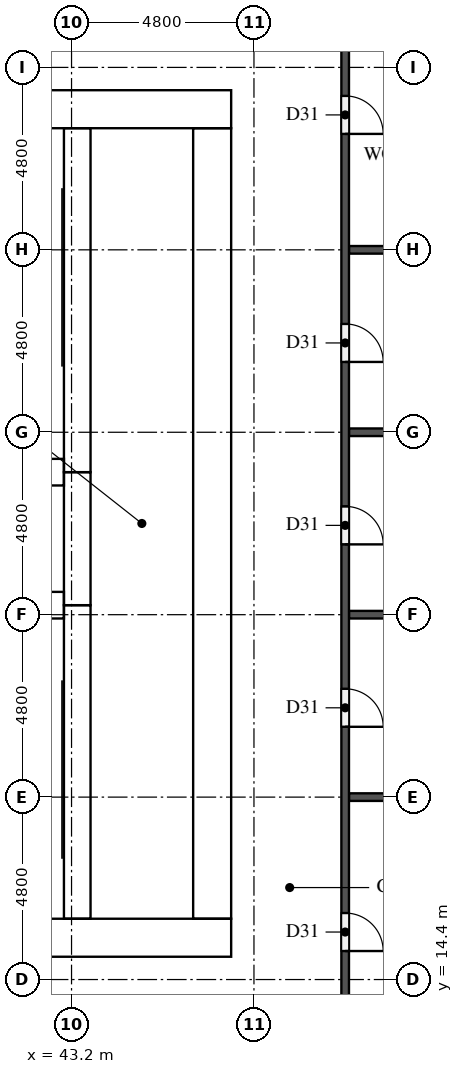
"""IFC4 building model, lengths in metres.
Left out: names, types, materials, properties, quantities, classifications, styles, units other than length and angle.
Written with IfcOpenShell. Run it as: python <this file> out.ifc"""

import sys

from ifc_helpers import new_model, si_unit, direction, frame, frame_2d, origin, place, context, subcontext, project, spatial, rectangle, extrude, element, fill, save


model = new_model("IFC4")
c1 = context("Model", 3, precision=1e-05, world=origin(), true_north=direction((0.0, 1.0)))
c2 = subcontext(c1, "Body", "Model", "MODEL_VIEW")
j1 = project(units=[si_unit("LENGTHUNIT", "METRE"), si_unit("PLANEANGLEUNIT", "RADIAN")], contexts=[c1])
p1 = place(None, origin())
s1 = spatial("IfcSite", under=j1, at=p1, CompositionType="ELEMENT")
p2 = place(p1, origin())
s2 = spatial("IfcBuilding", under=s1, at=p2, CompositionType="ELEMENT")
p3 = place(p2, frame((0.0, 0.0, 24.0)))
s3 = spatial("IfcBuildingStorey", under=s2, at=p3, CompositionType="ELEMENT", Elevation=24.0)
p4 = place(p3, frame((15.0, 15.5, 0.0), z_axis=(0.0, 0.0, 1.0), x_axis=(1.0, 0.0, 0.0)))
e1 = element("IfcWall", 1, at=p4, inside=s3, PredefinedType="SHEAR", context=c2, shape_type="SweptSolid", body=[
    extrude(rectangle(XDim=32.4, YDim=1.0, at=frame_2d((16.2, 0.0))), origin(), (0.0, 0.0, 1.0), 5.1),
])
p5 = place(p4, frame((15.3, 0.0, 0.0)))
e2 = element("IfcOpeningElement", 2, at=p5, cuts=e1, PredefinedType="OPENING", context=c2, shape_type="SweptSolid", body=[
    extrude(rectangle(XDim=1.8, YDim=2.1, at=frame_2d((0.9, 1.05))), frame((0.0, 0.51, 0.0), z_axis=(0.0, -1.0, 0.0), x_axis=(1.0, 0.0, 0.0)), (0.0, 0.0, 1.0), 1.02),
])
p6 = place(p3, frame((15.0, 37.3, 0.0), z_axis=(0.0, 0.0, 1.0), x_axis=(1.0, 0.0, 0.0)))
e3 = element("IfcWall", 3, at=p6, inside=s3, PredefinedType="SHEAR", context=c2, shape_type="SweptSolid", body=[
    extrude(rectangle(XDim=32.4, YDim=1.0, at=frame_2d((16.2, 0.0))), origin(), (0.0, 0.0, 1.0), 5.1),
])
p7 = place(p6, frame((15.3, 0.0, 0.0)))
e4 = element("IfcOpeningElement", 4, at=p7, cuts=e3, PredefinedType="OPENING", context=c2, shape_type="SweptSolid", body=[
    extrude(rectangle(XDim=1.8, YDim=2.1, at=frame_2d((0.9, 1.05))), frame((0.0, 0.51, 0.0), z_axis=(0.0, -1.0, 0.0), x_axis=(1.0, 0.0, 0.0)), (0.0, 0.0, 1.0), 1.02),
])
p8 = place(p6, frame((1.766, 0.0, 0.0)))
e5 = element("IfcOpeningElement", 5, at=p8, cuts=e3, PredefinedType="OPENING", context=c2, shape_type="SweptSolid", body=[
    extrude(rectangle(XDim=1.0, YDim=2.1, at=frame_2d((0.5, 1.05))), frame((0.0, 0.51, 0.0), z_axis=(0.0, -1.0, 0.0), x_axis=(1.0, 0.0, 0.0)), (0.0, 0.0, 1.0), 1.02),
])
p9 = place(p6, frame((5.241, 0.0, 0.0)))
e6 = element("IfcOpeningElement", 6, at=p9, cuts=e3, PredefinedType="OPENING", context=c2, shape_type="SweptSolid", body=[
    extrude(rectangle(XDim=1.0, YDim=2.1, at=frame_2d((0.5, 1.05))), frame((0.0, 0.51, 0.0), z_axis=(0.0, -1.0, 0.0), x_axis=(1.0, 0.0, 0.0)), (0.0, 0.0, 1.0), 1.02),
])
p10 = place(p3, frame((46.9, 16.0, 0.0), z_axis=(0.0, 0.0, 1.0), x_axis=(0.0, 1.0, 0.0)))
e7 = element("IfcWall", 7, at=p10, inside=s3, PredefinedType="SHEAR", context=c2, shape_type="SweptSolid", body=[
    extrude(rectangle(XDim=20.8, YDim=1.0, at=frame_2d((10.4, 0.0))), origin(), (0.0, 0.0, 1.0), 5.1),
])
p11 = place(p10, frame((10.1, 0.0, 0.0)))
e8 = element("IfcOpeningElement", 8, at=p11, cuts=e7, PredefinedType="OPENING", context=c2, shape_type="SweptSolid", body=[
    extrude(rectangle(XDim=1.2, YDim=2.1, at=frame_2d((0.6, 1.05))), frame((0.0, 0.51, 0.0), z_axis=(0.0, -1.0, 0.0), x_axis=(1.0, 0.0, 0.0)), (0.0, 0.0, 1.0), 1.02),
])
p12 = place(p3, frame((43.35, 16.0, 0.0), z_axis=(0.0, 0.0, 1.0), x_axis=(0.0, 1.0, 0.0)))
e9 = element("IfcWall", 9, at=p12, inside=s3, PredefinedType="SHEAR", context=c2, shape_type="SweptSolid", body=[
    extrude(rectangle(XDim=8.25, YDim=0.7, at=frame_2d((4.125, 0.0))), origin(), (0.0, 0.0, 1.0), 5.1),
])
p13 = place(p12, frame((0.2, 0.0, 0.0)))
e10 = element("IfcOpeningElement", 10, at=p13, cuts=e9, PredefinedType="OPENING", context=c2, shape_type="SweptSolid", body=[
    extrude(rectangle(XDim=1.2, YDim=2.1, at=frame_2d((0.6, 1.05))), frame((0.0, 0.36, 0.0), z_axis=(0.0, -1.0, 0.0), x_axis=(1.0, 0.0, 0.0)), (0.0, 0.0, 1.0), 0.72),
])
p14 = place(p3, frame((43.35, 24.25, 0.0), z_axis=(0.0, 0.0, 1.0), x_axis=(0.0, 1.0, 0.0)))
e11 = element("IfcWall", 11, at=p14, inside=s3, PredefinedType="SHEAR", context=c2, shape_type="SweptSolid", body=[
    extrude(rectangle(XDim=3.5, YDim=0.7, at=frame_2d((1.75, 0.0))), origin(), (0.0, 0.0, 1.0), 5.1),
])
p15 = place(p14, frame((1.2, 0.0, 0.0)))
e12 = element("IfcOpeningElement", 12, at=p15, cuts=e11, PredefinedType="OPENING", context=c2, shape_type="SweptSolid", body=[
    extrude(rectangle(XDim=1.1, YDim=2.1, at=frame_2d((0.55, 1.05))), frame((0.0, 0.36, 0.0), z_axis=(0.0, -1.0, 0.0), x_axis=(1.0, 0.0, 0.0)), (0.0, 0.0, 1.0), 0.72),
])
p16 = place(p3, frame((43.35, 27.75, 0.0), z_axis=(0.0, 0.0, 1.0), x_axis=(0.0, 1.0, 0.0)))
e13 = element("IfcWall", 13, at=p16, inside=s3, PredefinedType="SHEAR", context=c2, shape_type="SweptSolid", body=[
    extrude(rectangle(XDim=9.05, YDim=0.7, at=frame_2d((4.525, 0.0))), origin(), (0.0, 0.0, 1.0), 5.1),
])
p17 = place(p16, frame((7.65, 0.0, 0.0)))
e14 = element("IfcOpeningElement", 14, at=p17, cuts=e13, PredefinedType="OPENING", context=c2, shape_type="SweptSolid", body=[
    extrude(rectangle(XDim=1.2, YDim=2.1, at=frame_2d((0.6, 1.05))), frame((0.0, 0.36, 0.0), z_axis=(0.0, -1.0, 0.0), x_axis=(1.0, 0.0, 0.0)), (0.0, 0.0, 1.0), 0.72),
])
for number, where, z_axis, x_axis in (
    (15, (39.65, 24.25, 0.0), (0.0, 0.0, 1.0), (1.0, 0.0, 0.0)),
    (16, (39.65, 27.75, 0.0), (0.0, 0.0, 1.0), (1.0, 0.0, 0.0)),
):
    element("IfcWall", number, at=place(p3, frame(where, z_axis=z_axis, x_axis=x_axis)), inside=s3, PredefinedType="SHEAR", context=c2, shape_type="SweptSolid", body=[
        extrude(rectangle(XDim=3.35, YDim=0.7, at=frame_2d((1.675, 0.0))), origin(), (0.0, 0.0, 1.0), 5.1),
    ])
for number, where, z_axis, x_axis in (
    (17, (50.5, 19.2, 0.0), (0.0, 0.0, 1.0), (1.0, 0.0, 0.0)),
    (18, (50.5, 24.0, 0.0), (0.0, 0.0, 1.0), (1.0, 0.0, 0.0)),
    (19, (50.5, 28.8, 0.0), (0.0, 0.0, 1.0), (1.0, 0.0, 0.0)),
    (20, (50.5, 33.6, 0.0), (0.0, 0.0, 1.0), (1.0, 0.0, 0.0)),
):
    element("IfcWall", number, at=place(p3, frame(where, z_axis=z_axis, x_axis=x_axis)), inside=s3, PredefinedType="PARTITIONING", context=c2, shape_type="SweptSolid", body=[
        extrude(rectangle(XDim=4.8, YDim=0.2, at=frame_2d((2.4, 0.0))), origin(), (0.0, 0.0, 1.0), 5.1),
    ])
p18 = place(p3, frame((50.4, 40.7, 0.0), z_axis=(0.0, 0.0, 1.0), x_axis=(0.0, -1.0, 0.0)))
e21 = element("IfcWall", 21, at=p18, inside=s3, PredefinedType="PARTITIONING", context=c2, shape_type="SweptSolid", body=[
    extrude(rectangle(XDim=28.6, YDim=0.2, at=frame_2d((14.3, 0.0))), origin(), (0.0, 0.0, 1.0), 5.1),
])
p19 = place(p18, frame((24.55, 0.0, 0.0)))
e22 = element("IfcOpeningElement", 22, at=p19, cuts=e21, PredefinedType="OPENING", context=c2, shape_type="SweptSolid", body=[
    extrude(rectangle(XDim=1.0, YDim=2.1, at=frame_2d((0.5, 1.05))), frame((0.0, 0.11, 0.0), z_axis=(0.0, -1.0, 0.0), x_axis=(1.0, 0.0, 0.0)), (0.0, 0.0, 1.0), 0.22),
])
p20 = place(p18, frame((18.65, 0.0, 0.0)))
e23 = element("IfcOpeningElement", 23, at=p20, cuts=e21, PredefinedType="OPENING", context=c2, shape_type="SweptSolid", body=[
    extrude(rectangle(XDim=1.0, YDim=2.1, at=frame_2d((0.5, 1.05))), frame((0.0, 0.11, 0.0), z_axis=(0.0, -1.0, 0.0), x_axis=(1.0, 0.0, 0.0)), (0.0, 0.0, 1.0), 0.22),
])
p21 = place(p18, frame((13.85, 0.0, 0.0)))
e24 = element("IfcOpeningElement", 24, at=p21, cuts=e21, PredefinedType="OPENING", context=c2, shape_type="SweptSolid", body=[
    extrude(rectangle(XDim=1.0, YDim=2.1, at=frame_2d((0.5, 1.05))), frame((0.0, 0.11, 0.0), z_axis=(0.0, -1.0, 0.0), x_axis=(1.0, 0.0, 0.0)), (0.0, 0.0, 1.0), 0.22),
])
p22 = place(p18, frame((9.05, 0.0, 0.0)))
e25 = element("IfcOpeningElement", 25, at=p22, cuts=e21, PredefinedType="OPENING", context=c2, shape_type="SweptSolid", body=[
    extrude(rectangle(XDim=1.0, YDim=2.1, at=frame_2d((0.5, 1.05))), frame((0.0, 0.11, 0.0), z_axis=(0.0, -1.0, 0.0), x_axis=(1.0, 0.0, 0.0)), (0.0, 0.0, 1.0), 0.22),
])
p23 = place(p18, frame((3.05, 0.0, 0.0)))
e26 = element("IfcOpeningElement", 26, at=p23, cuts=e21, PredefinedType="OPENING", context=c2, shape_type="SweptSolid", body=[
    extrude(rectangle(XDim=1.0, YDim=2.1, at=frame_2d((0.5, 1.05))), frame((0.0, 0.11, 0.0), z_axis=(0.0, -1.0, 0.0), x_axis=(1.0, 0.0, 0.0)), (0.0, 0.0, 1.0), 0.22),
])
p24 = place(p15, origin())
e27 = element("IfcDoor", 27, at=p24, inside=s3, OperationType="DOUBLE_DOOR_SLIDING", PredefinedType="DOOR", context=c2, shape_type="SweptSolid", body=[
    extrude(rectangle(XDim=1.1, YDim=2.1, at=frame_2d((0.55, 1.05))), frame((0.0, 0.025, 0.0), z_axis=(0.0, -1.0, 0.0), x_axis=(1.0, 0.0, 0.0)), (0.0, 0.0, 1.0), 0.05),
])
fill(e12, e27)
p25 = place(p13, origin())
e28 = element("IfcDoor", 28, at=p25, inside=s3, OperationType="SINGLE_SWING_RIGHT", PredefinedType="DOOR", context=c2, shape_type="SweptSolid", body=[
    extrude(rectangle(XDim=1.2, YDim=2.1, at=frame_2d((0.6, 1.05))), frame((0.0, 0.025, 0.0), z_axis=(0.0, -1.0, 0.0), x_axis=(1.0, 0.0, 0.0)), (0.0, 0.0, 1.0), 0.05),
])
fill(e10, e28)
p26 = place(p17, origin())
e29 = element("IfcDoor", 29, at=p26, inside=s3, OperationType="SINGLE_SWING_LEFT", PredefinedType="DOOR", context=c2, shape_type="SweptSolid", body=[
    extrude(rectangle(XDim=1.2, YDim=2.1, at=frame_2d((0.6, 1.05))), frame((0.0, 0.025, 0.0), z_axis=(0.0, -1.0, 0.0), x_axis=(1.0, 0.0, 0.0)), (0.0, 0.0, 1.0), 0.05),
])
fill(e14, e29)
p27 = place(p11, origin())
e30 = element("IfcDoor", 30, at=p27, inside=s3, OperationType="SINGLE_SWING_LEFT", PredefinedType="DOOR", context=c2, shape_type="SweptSolid", body=[
    extrude(rectangle(XDim=1.2, YDim=2.1, at=frame_2d((0.6, 1.05))), frame((0.0, 0.025, 0.0), z_axis=(0.0, -1.0, 0.0), x_axis=(1.0, 0.0, 0.0)), (0.0, 0.0, 1.0), 0.05),
])
fill(e8, e30)
p28 = place(p19, origin())
e31 = element("IfcDoor", 31, at=p28, inside=s3, OperationType="SINGLE_SWING_RIGHT", PredefinedType="DOOR", context=c2, shape_type="SweptSolid", body=[
    extrude(rectangle(XDim=1.0, YDim=2.1, at=frame_2d((0.5, 1.05))), frame((0.0, 0.025, 0.0), z_axis=(0.0, -1.0, 0.0), x_axis=(1.0, 0.0, 0.0)), (0.0, 0.0, 1.0), 0.05),
])
fill(e22, e31)
p29 = place(p20, origin())
e32 = element("IfcDoor", 32, at=p29, inside=s3, OperationType="SINGLE_SWING_RIGHT", PredefinedType="DOOR", context=c2, shape_type="SweptSolid", body=[
    extrude(rectangle(XDim=1.0, YDim=2.1, at=frame_2d((0.5, 1.05))), frame((0.0, 0.025, 0.0), z_axis=(0.0, -1.0, 0.0), x_axis=(1.0, 0.0, 0.0)), (0.0, 0.0, 1.0), 0.05),
])
fill(e23, e32)
p30 = place(p21, origin())
e33 = element("IfcDoor", 33, at=p30, inside=s3, OperationType="SINGLE_SWING_RIGHT", PredefinedType="DOOR", context=c2, shape_type="SweptSolid", body=[
    extrude(rectangle(XDim=1.0, YDim=2.1, at=frame_2d((0.5, 1.05))), frame((0.0, 0.025, 0.0), z_axis=(0.0, -1.0, 0.0), x_axis=(1.0, 0.0, 0.0)), (0.0, 0.0, 1.0), 0.05),
])
fill(e24, e33)
p31 = place(p22, origin())
e34 = element("IfcDoor", 34, at=p31, inside=s3, OperationType="SINGLE_SWING_RIGHT", PredefinedType="DOOR", context=c2, shape_type="SweptSolid", body=[
    extrude(rectangle(XDim=1.0, YDim=2.1, at=frame_2d((0.5, 1.05))), frame((0.0, 0.025, 0.0), z_axis=(0.0, -1.0, 0.0), x_axis=(1.0, 0.0, 0.0)), (0.0, 0.0, 1.0), 0.05),
])
fill(e25, e34)
p32 = place(p23, origin())
e35 = element("IfcDoor", 35, at=p32, inside=s3, OperationType="SINGLE_SWING_RIGHT", PredefinedType="DOOR", context=c2, shape_type="SweptSolid", body=[
    extrude(rectangle(XDim=1.0, YDim=2.1, at=frame_2d((0.5, 1.05))), frame((0.0, 0.025, 0.0), z_axis=(0.0, -1.0, 0.0), x_axis=(1.0, 0.0, 0.0)), (0.0, 0.0, 1.0), 0.05),
])
fill(e26, e35)
save(model, sys.argv[1])
